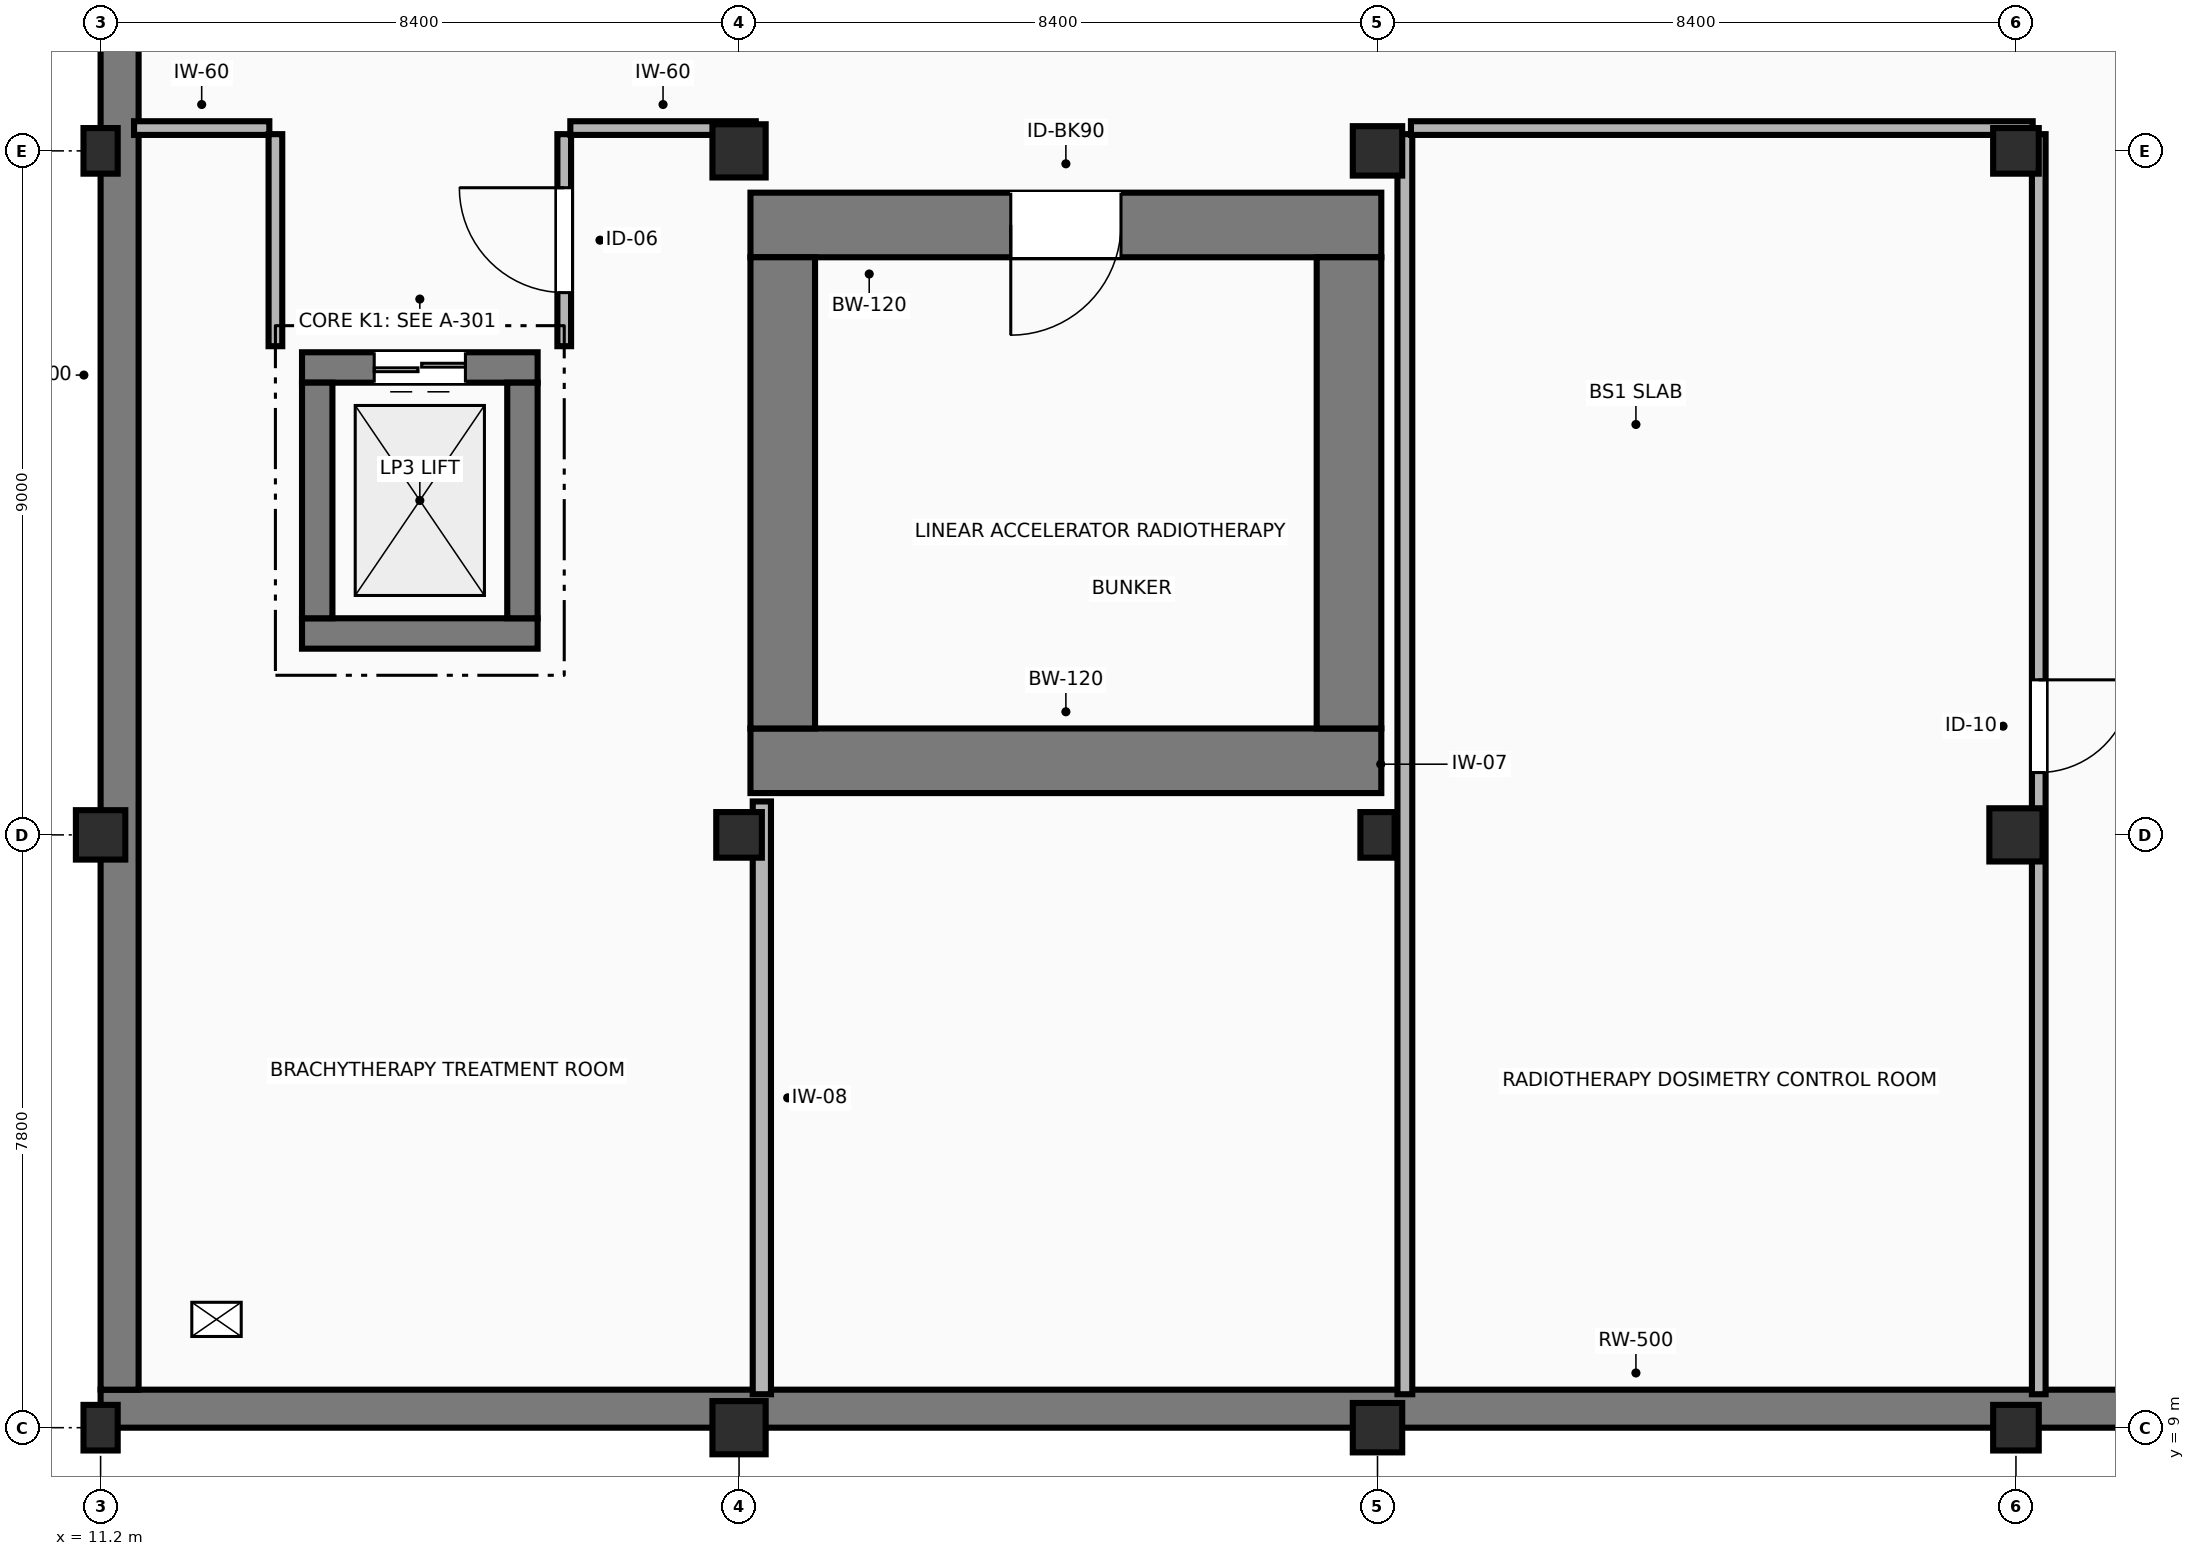
"""IFC4 building model, lengths in metres.
Left out: names, types, materials, properties, quantities, classifications, styles, units other than length and angle.
Written with IfcOpenShell. Run it as: python <this file> out.ifc"""

import sys

from ifc_helpers import new_model, si_unit, direction, frame, frame_2d, origin, origin_2d, place, context, subcontext, project, spatial, rectangle, extrude, element, fill, save


model = new_model("IFC4")
c1 = context("Model", 3, precision=1e-05, world=origin(), true_north=direction((0.0, 1.0)))
c2 = subcontext(c1, "Body", "Model", "MODEL_VIEW")
j1 = project(units=[si_unit("LENGTHUNIT", "METRE"), si_unit("PLANEANGLEUNIT", "RADIAN")], contexts=[c1])
p1 = place(None, origin())
s1 = spatial("IfcSite", under=j1, at=p1, CompositionType="ELEMENT")
p2 = place(p1, origin())
s2 = spatial("IfcBuilding", under=s1, at=p2, CompositionType="ELEMENT")
p3 = place(p2, frame((0.0, 0.0, -4.5)))
s3 = spatial("IfcBuildingStorey", under=s2, at=p3, CompositionType="ELEMENT", Elevation=-4.5)
p4 = place(p3, frame((11.2, 9.0, -0.55), z_axis=(0.0, 0.0, 1.0), x_axis=(1.0, 0.0, 0.0)))
e1 = element("IfcColumn", 1, at=p4, inside=s3, PredefinedType="COLUMN", context=c2, shape_type="SweptSolid", body=[
    extrude(rectangle(XDim=0.45, YDim=0.6, at=origin_2d()), origin(), (0.0, 0.0, 1.0), 5.05),
])
p5 = place(p3, frame((11.2, 16.8, -0.55), z_axis=(0.0, 0.0, 1.0), x_axis=(1.0, 0.0, 0.0)))
e2 = element("IfcColumn", 2, at=p5, inside=s3, PredefinedType="COLUMN", context=c2, shape_type="SweptSolid", body=[
    extrude(rectangle(XDim=0.65, YDim=0.65, at=origin_2d()), origin(), (0.0, 0.0, 1.0), 5.05),
])
p6 = place(p3, frame((11.2, 25.8, -0.55), z_axis=(0.0, 0.0, 1.0), x_axis=(1.0, 0.0, 0.0)))
e3 = element("IfcColumn", 3, at=p6, inside=s3, PredefinedType="COLUMN", context=c2, shape_type="SweptSolid", body=[
    extrude(rectangle(XDim=0.45, YDim=0.6, at=origin_2d()), origin(), (0.0, 0.0, 1.0), 5.05),
])
p7 = place(p3, frame((19.6, 9.0, -0.55), z_axis=(0.0, 0.0, 1.0), x_axis=(1.0, 0.0, 0.0)))
e4 = element("IfcColumn", 4, at=p7, inside=s3, PredefinedType="COLUMN", context=c2, shape_type="SweptSolid", body=[
    extrude(rectangle(XDim=0.7, YDim=0.7, at=origin_2d()), origin(), (0.0, 0.0, 1.0), 5.05),
])
p8 = place(p3, frame((19.6, 16.8, -0.55), z_axis=(0.0, 0.0, 1.0), x_axis=(1.0, 0.0, 0.0)))
e5 = element("IfcColumn", 5, at=p8, inside=s3, PredefinedType="COLUMN", context=c2, shape_type="SweptSolid", body=[
    extrude(rectangle(XDim=0.6, YDim=0.6, at=origin_2d()), origin(), (0.0, 0.0, 1.0), 5.05),
])
p9 = place(p3, frame((19.6, 25.8, -0.55), z_axis=(0.0, 0.0, 1.0), x_axis=(1.0, 0.0, 0.0)))
e6 = element("IfcColumn", 6, at=p9, inside=s3, PredefinedType="COLUMN", context=c2, shape_type="SweptSolid", body=[
    extrude(rectangle(XDim=0.7, YDim=0.7, at=origin_2d()), origin(), (0.0, 0.0, 1.0), 5.05),
])
p10 = place(p3, frame((28.0, 9.0, -0.55), z_axis=(0.0, 0.0, 1.0), x_axis=(1.0, 0.0, 0.0)))
e7 = element("IfcColumn", 7, at=p10, inside=s3, PredefinedType="COLUMN", context=c2, shape_type="SweptSolid", body=[
    extrude(rectangle(XDim=0.65, YDim=0.65, at=origin_2d()), origin(), (0.0, 0.0, 1.0), 5.05),
])
p11 = place(p3, frame((28.0, 16.8, -0.55), z_axis=(0.0, 0.0, 1.0), x_axis=(1.0, 0.0, 0.0)))
e8 = element("IfcColumn", 8, at=p11, inside=s3, PredefinedType="COLUMN", context=c2, shape_type="SweptSolid", body=[
    extrude(rectangle(XDim=0.45, YDim=0.6, at=origin_2d()), origin(), (0.0, 0.0, 1.0), 5.05),
])
p12 = place(p3, frame((28.0, 25.8, -0.55), z_axis=(0.0, 0.0, 1.0), x_axis=(1.0, 0.0, 0.0)))
e9 = element("IfcColumn", 9, at=p12, inside=s3, PredefinedType="COLUMN", context=c2, shape_type="SweptSolid", body=[
    extrude(rectangle(XDim=0.65, YDim=0.65, at=origin_2d()), origin(), (0.0, 0.0, 1.0), 5.05),
])
p13 = place(p3, frame((36.4, 9.0, -0.55), z_axis=(0.0, 0.0, 1.0), x_axis=(1.0, 0.0, 0.0)))
e10 = element("IfcColumn", 10, at=p13, inside=s3, PredefinedType="COLUMN", context=c2, shape_type="SweptSolid", body=[
    extrude(rectangle(XDim=0.6, YDim=0.6, at=origin_2d()), origin(), (0.0, 0.0, 1.0), 5.05),
])
p14 = place(p3, frame((36.4, 16.8, -0.55), z_axis=(0.0, 0.0, 1.0), x_axis=(1.0, 0.0, 0.0)))
e11 = element("IfcColumn", 11, at=p14, inside=s3, PredefinedType="COLUMN", context=c2, shape_type="SweptSolid", body=[
    extrude(rectangle(XDim=0.7, YDim=0.7, at=origin_2d()), origin(), (0.0, 0.0, 1.0), 5.05),
])
p15 = place(p3, frame((36.4, 25.8, -0.55), z_axis=(0.0, 0.0, 1.0), x_axis=(1.0, 0.0, 0.0)))
e12 = element("IfcColumn", 12, at=p15, inside=s3, PredefinedType="COLUMN", context=c2, shape_type="SweptSolid", body=[
    extrude(rectangle(XDim=0.6, YDim=0.6, at=origin_2d()), origin(), (0.0, 0.0, 1.0), 5.05),
])
p16 = place(p3, frame((11.2, 9.25, 0.0), z_axis=(0.0, 0.0, 1.0), x_axis=(1.0, 0.0, 0.0)))
e13 = element("IfcWall", 13, at=p16, inside=s3, PredefinedType="SHEAR", context=c2, shape_type="SweptSolid", body=[
    extrude(rectangle(XDim=40.4, YDim=0.5, at=frame_2d((20.2, 0.0))), origin(), (0.0, 0.0, 1.0), 4.15),
])
p17 = place(p3, frame((11.45, 9.5, 0.0), z_axis=(0.0, 0.0, 1.0), x_axis=(0.0, 1.0, 0.0)))
e14 = element("IfcWall", 14, at=p17, inside=s3, PredefinedType="SHEAR", context=c2, shape_type="SweptSolid", body=[
    extrude(rectangle(XDim=34.4, YDim=0.5, at=frame_2d((17.2, 0.0))), origin(), (0.0, 0.0, 1.0), 4.15),
])
p18 = place(p3, frame((13.85, 19.45, -0.55), z_axis=(0.0, 0.0, 1.0), x_axis=(1.0, 0.0, 0.0)))
e15 = element("IfcWall", 15, at=p18, inside=s3, PredefinedType="SHEAR", context=c2, shape_type="SweptSolid", body=[
    extrude(rectangle(XDim=3.1, YDim=0.4, at=frame_2d((1.55, 0.0))), origin(), (0.0, 0.0, 1.0), 5.05),
])
p19 = place(p3, frame((16.95, 22.95, -0.55), z_axis=(0.0, 0.0, 1.0), x_axis=(-1.0, 0.0, 0.0)))
e16 = element("IfcWall", 16, at=p19, inside=s3, PredefinedType="SHEAR", context=c2, shape_type="SweptSolid", body=[
    extrude(rectangle(XDim=3.1, YDim=0.4, at=frame_2d((1.55, 0.0))), origin(), (0.0, 0.0, 1.0), 5.05),
])
p20 = place(p19, frame((0.95, 0.0, 0.55)))
e17 = element("IfcOpeningElement", 17, at=p20, cuts=e16, PredefinedType="OPENING", context=c2, shape_type="SweptSolid", body=[
    extrude(rectangle(XDim=1.2, YDim=2.2, at=frame_2d((0.6, 1.1))), frame((0.0, 0.21, 0.0), z_axis=(0.0, -1.0, 0.0), x_axis=(1.0, 0.0, 0.0)), (0.0, 0.0, 1.0), 0.42),
])
for number, where, z_axis, x_axis in (
    (18, (14.05, 19.65, -0.55), (0.0, 0.0, 1.0), (0.0, 1.0, 0.0)),
    (19, (16.75, 22.75, -0.55), (0.0, 0.0, 1.0), (0.0, -1.0, 0.0)),
):
    element("IfcWall", number, at=place(p3, frame(where, z_axis=z_axis, x_axis=x_axis)), inside=s3, PredefinedType="SHEAR", context=c2, shape_type="SweptSolid", body=[
        extrude(rectangle(XDim=3.1, YDim=0.4, at=frame_2d((1.55, 0.0))), origin(), (0.0, 0.0, 1.0), 5.05),
    ])
p21 = place(p3, frame((19.75, 17.775, 0.0), z_axis=(0.0, 0.0, 1.0), x_axis=(1.0, 0.0, 0.0)))
e20 = element("IfcWall", 20, at=p21, inside=s3, PredefinedType="SHEAR", context=c2, shape_type="SweptSolid", body=[
    extrude(rectangle(XDim=8.3, YDim=0.85, at=frame_2d((4.15, 0.0))), origin(), (0.0, 0.0, 1.0), 4.15),
])
p22 = place(p3, frame((28.05, 24.825, 0.0), z_axis=(0.0, 0.0, 1.0), x_axis=(-1.0, 0.0, 0.0)))
e21 = element("IfcWall", 21, at=p22, inside=s3, PredefinedType="SHEAR", context=c2, shape_type="SweptSolid", body=[
    extrude(rectangle(XDim=8.3, YDim=0.85, at=frame_2d((4.15, 0.0))), origin(), (0.0, 0.0, 1.0), 4.15),
])
p23 = place(p22, frame((3.425, 0.0, 0.0)))
e22 = element("IfcOpeningElement", 22, at=p23, cuts=e21, PredefinedType="OPENING", context=c2, shape_type="SweptSolid", body=[
    extrude(rectangle(XDim=1.45, YDim=2.3, at=frame_2d((0.725, 1.15))), frame((0.0, 0.435, 0.0), z_axis=(0.0, -1.0, 0.0), x_axis=(1.0, 0.0, 0.0)), (0.0, 0.0, 1.0), 0.87),
])
for number, where, z_axis, x_axis in (
    (23, (20.175, 18.2, 0.0), (0.0, 0.0, 1.0), (0.0, 1.0, 0.0)),
    (24, (27.625, 24.4, 0.0), (0.0, 0.0, 1.0), (0.0, -1.0, 0.0)),
):
    element("IfcWall", number, at=place(p3, frame(where, z_axis=z_axis, x_axis=x_axis)), inside=s3, PredefinedType="SHEAR", context=c2, shape_type="SweptSolid", body=[
        extrude(rectangle(XDim=6.2, YDim=0.85, at=frame_2d((3.1, 0.0))), origin(), (0.0, 0.0, 1.0), 4.15),
    ])
p24 = place(p3, frame((17.3, 23.23, 0.0), z_axis=(0.0, 0.0, 1.0), x_axis=(0.0, 1.0, 0.0)))
e25 = element("IfcWall", 25, at=p24, inside=s3, PredefinedType="PARTITIONING", context=c2, shape_type="SweptSolid", body=[
    extrude(rectangle(XDim=2.79, YDim=0.18, at=frame_2d((1.395, 0.0))), origin(), (0.0, 0.0, 1.0), 4.15),
])
p25 = place(p24, frame((0.705, 0.0, 0.0)))
e26 = element("IfcOpeningElement", 26, at=p25, cuts=e25, PredefinedType="OPENING", context=c2, shape_type="SweptSolid", body=[
    extrude(rectangle(XDim=1.38, YDim=2.25, at=frame_2d((0.69, 1.125))), frame((0.0, 0.1, 0.0), z_axis=(0.0, -1.0, 0.0), x_axis=(1.0, 0.0, 0.0)), (0.0, 0.0, 1.0), 0.2),
])
p26 = place(p3, frame((17.38, 26.1, 0.0), z_axis=(0.0, 0.0, 1.0), x_axis=(1.0, 0.0, 0.0)))
e27 = element("IfcWall", 27, at=p26, inside=s3, PredefinedType="PARTITIONING", context=c2, shape_type="SweptSolid", body=[
    extrude(rectangle(XDim=2.44, YDim=0.18, at=frame_2d((1.22, 0.0))), origin(), (0.0, 0.0, 1.0), 3.485),
])
p27 = place(p3, frame((19.9, 17.24, 0.0), z_axis=(0.0, 0.0, 1.0), x_axis=(0.0, -1.0, 0.0)))
e28 = element("IfcWall", 28, at=p27, inside=s3, PredefinedType="PARTITIONING", context=c2, shape_type="SweptSolid", body=[
    extrude(rectangle(XDim=7.8, YDim=0.24, at=frame_2d((3.9, 0.0))), origin(), (0.0, 0.0, 1.0), 3.635),
])
p28 = place(p3, frame((11.64, 26.1, 0.0), z_axis=(0.0, 0.0, 1.0), x_axis=(1.0, 0.0, 0.0)))
e29 = element("IfcWall", 29, at=p28, inside=s3, PredefinedType="PARTITIONING", context=c2, shape_type="SweptSolid", body=[
    extrude(rectangle(XDim=1.78, YDim=0.18, at=frame_2d((0.89, 0.0))), origin(), (0.0, 0.0, 1.0), 3.485),
])
p29 = place(p3, frame((13.5, 26.02, 0.0), z_axis=(0.0, 0.0, 1.0), x_axis=(0.0, -1.0, 0.0)))
e30 = element("IfcWall", 30, at=p29, inside=s3, PredefinedType="PARTITIONING", context=c2, shape_type="SweptSolid", body=[
    extrude(rectangle(XDim=2.79, YDim=0.18, at=frame_2d((1.395, 0.0))), origin(), (0.0, 0.0, 1.0), 4.15),
])
p30 = place(p3, frame((28.36, 9.44, 0.0), z_axis=(0.0, 0.0, 1.0), x_axis=(0.0, 1.0, 0.0)))
e31 = element("IfcWall", 31, at=p30, inside=s3, PredefinedType="PARTITIONING", context=c2, shape_type="SweptSolid", body=[
    extrude(rectangle(XDim=16.58, YDim=0.195, at=frame_2d((8.29, 0.0))), origin(), (0.0, 0.0, 1.0), 3.635),
])
p31 = place(p3, frame((28.44, 26.1, 0.0), z_axis=(0.0, 0.0, 1.0), x_axis=(1.0, 0.0, 0.0)))
e32 = element("IfcWall", 32, at=p31, inside=s3, PredefinedType="PARTITIONING", context=c2, shape_type="SweptSolid", body=[
    extrude(rectangle(XDim=8.18, YDim=0.18, at=frame_2d((4.09, 0.0))), origin(), (0.0, 0.0, 1.0), 3.485),
])
p32 = place(p3, frame((36.7, 26.02, 0.0), z_axis=(0.0, 0.0, 1.0), x_axis=(0.0, -1.0, 0.0)))
e33 = element("IfcWall", 33, at=p32, inside=s3, PredefinedType="PARTITIONING", context=c2, shape_type="SweptSolid", body=[
    extrude(rectangle(XDim=16.58, YDim=0.18, at=frame_2d((8.29, 0.0))), origin(), (0.0, 0.0, 1.0), 3.635),
])
p33 = place(p32, frame((7.18, 0.0, 0.0)))
e34 = element("IfcOpeningElement", 34, at=p33, cuts=e33, PredefinedType="OPENING", context=c2, shape_type="SweptSolid", body=[
    extrude(rectangle(XDim=1.22, YDim=2.18, at=frame_2d((0.61, 1.09))), frame((0.0, 0.1, 0.0), z_axis=(0.0, -1.0, 0.0), x_axis=(1.0, 0.0, 0.0)), (0.0, 0.0, 1.0), 0.2),
])
p34 = place(p20, origin())
e35 = element("IfcDoor", 35, at=p34, inside=s3, OperationType="DOUBLE_DOOR_SLIDING", PredefinedType="DOOR", context=c2, shape_type="SweptSolid", body=[
    extrude(rectangle(XDim=1.2, YDim=2.2, at=frame_2d((0.6, 1.1))), frame((0.0, 0.025, 0.0), z_axis=(0.0, -1.0, 0.0), x_axis=(1.0, 0.0, 0.0)), (0.0, 0.0, 1.0), 0.05),
])
fill(e17, e35)
p35 = place(p23, origin())
e36 = element("IfcDoor", 36, at=p35, inside=s3, OperationType="SINGLE_SWING_RIGHT", PredefinedType="DOOR", context=c2, shape_type="SweptSolid", body=[
    extrude(rectangle(XDim=1.45, YDim=2.3, at=frame_2d((0.725, 1.15))), frame((0.0, 0.025, 0.0), z_axis=(0.0, -1.0, 0.0), x_axis=(1.0, 0.0, 0.0)), (0.0, 0.0, 1.0), 0.05),
])
fill(e22, e36)
p36 = place(p25, origin())
e37 = element("IfcDoor", 37, at=p36, inside=s3, OperationType="SINGLE_SWING_RIGHT", PredefinedType="DOOR", context=c2, shape_type="SweptSolid", body=[
    extrude(rectangle(XDim=1.38, YDim=2.25, at=frame_2d((0.69, 1.125))), frame((0.0, 0.025, 0.0), z_axis=(0.0, -1.0, 0.0), x_axis=(1.0, 0.0, 0.0)), (0.0, 0.0, 1.0), 0.05),
])
fill(e26, e37)
p37 = place(p33, origin())
e38 = element("IfcDoor", 38, at=p37, inside=s3, OperationType="SINGLE_SWING_LEFT", PredefinedType="DOOR", context=c2, shape_type="SweptSolid", body=[
    extrude(rectangle(XDim=1.22, YDim=2.18, at=frame_2d((0.61, 1.09))), frame((0.0, 0.025, 0.0), z_axis=(0.0, -1.0, 0.0), x_axis=(1.0, 0.0, 0.0)), (0.0, 0.0, 1.0), 0.05),
])
fill(e34, e38)
save(model, sys.argv[1])
